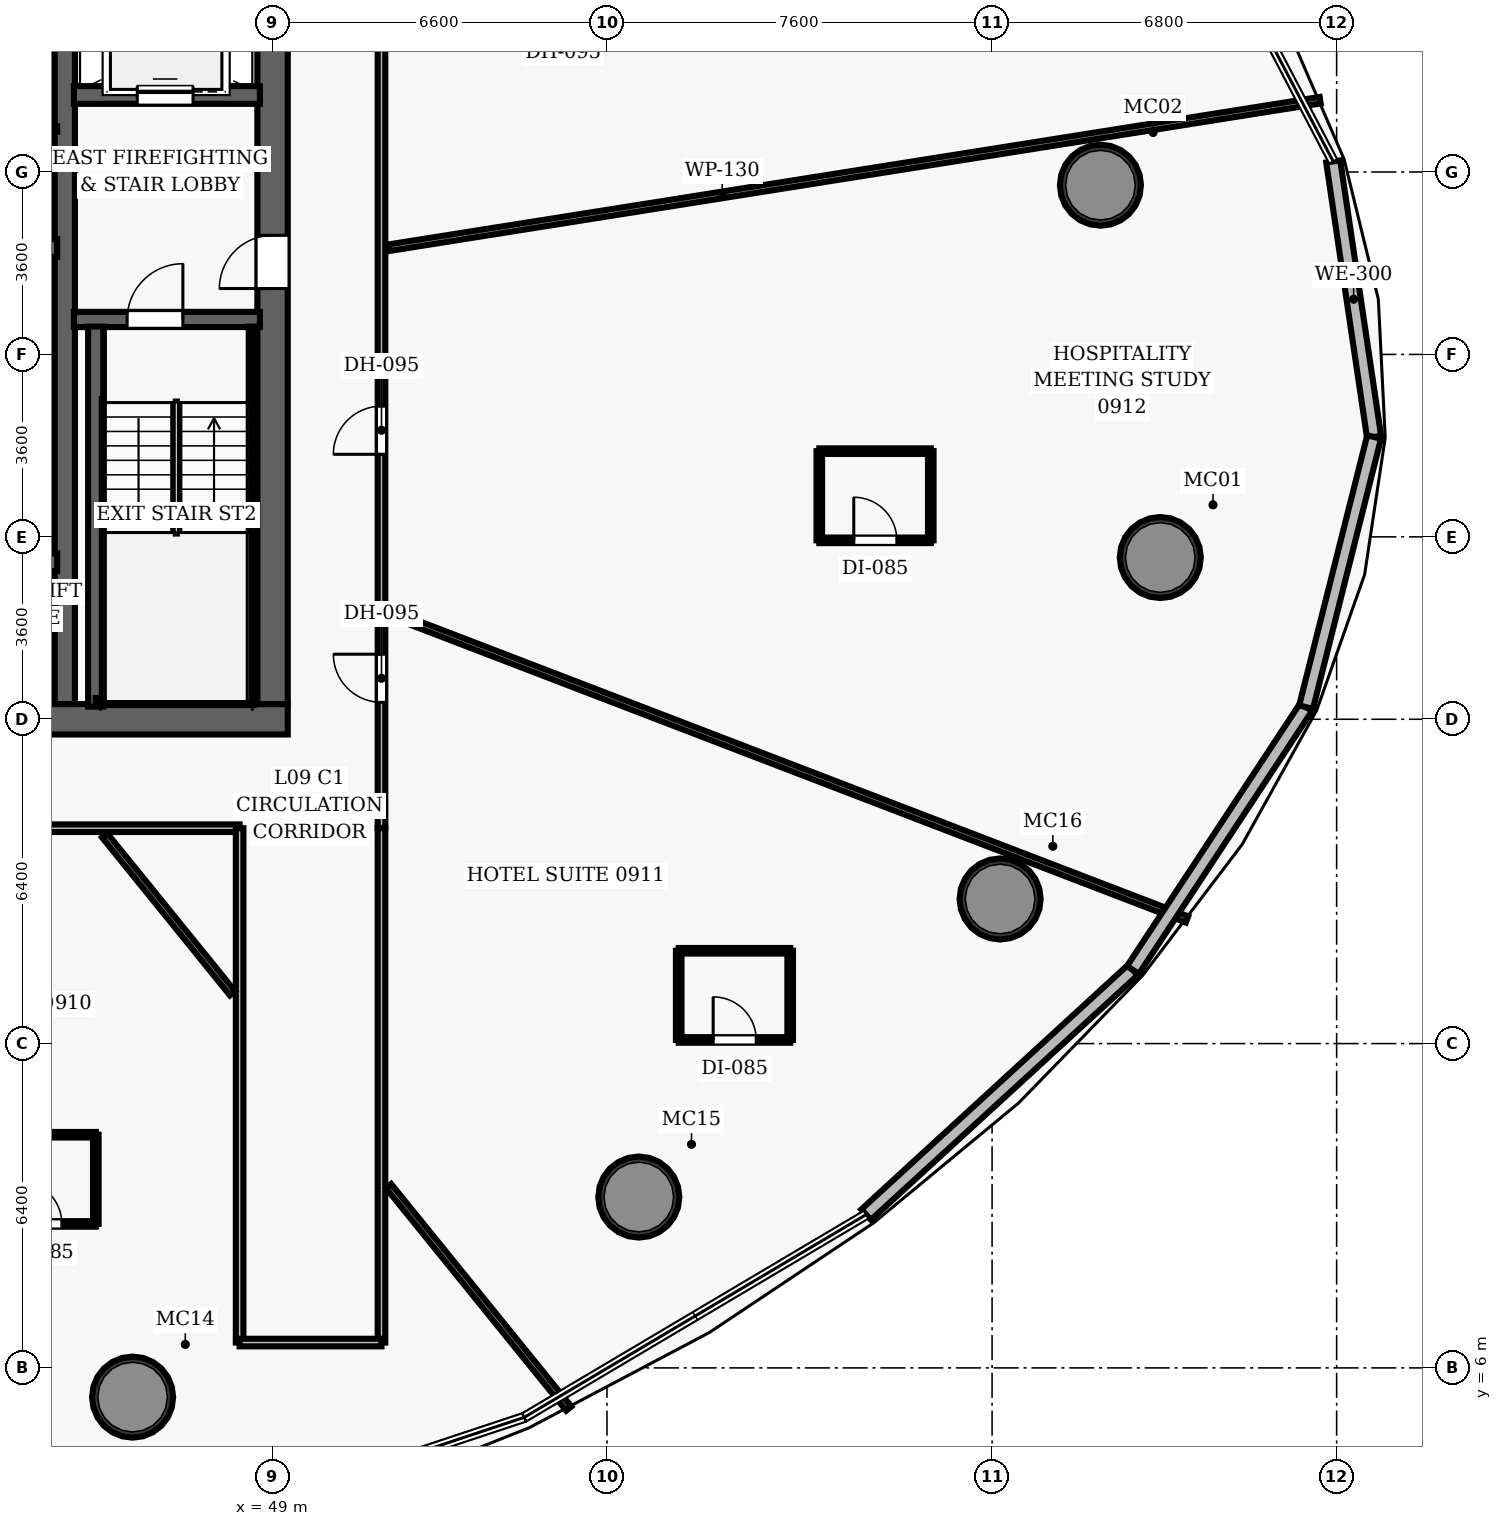
"""IFC4 building model, lengths in metres.
Left out: names, types, materials, properties, quantities, classifications, styles, units other than length and angle.
Written with IfcOpenShell. Run it as: python <this file> out.ifc"""

import sys

from ifc_helpers import new_model, si_unit, direction, frame, frame_2d, origin, origin_2d, place, context, subcontext, project, spatial, rectangle, hollow_circle, extrude, element, fill, save


model = new_model("IFC4")
c1 = context("Model", 3, precision=1e-05, world=origin(), true_north=direction((0.0, 1.0)))
c2 = subcontext(c1, "Body", "Model", "MODEL_VIEW")
j1 = project(units=[si_unit("LENGTHUNIT", "METRE"), si_unit("PLANEANGLEUNIT", "RADIAN")], contexts=[c1])
p1 = place(None, origin())
s1 = spatial("IfcSite", under=j1, at=p1, CompositionType="ELEMENT")
p2 = place(p1, origin())
s2 = spatial("IfcBuilding", under=s1, at=p2, CompositionType="ELEMENT")
p3 = place(p2, frame((0.0, 0.0, 48.4)))
s3 = spatial("IfcBuildingStorey", under=s2, at=p3, CompositionType="ELEMENT", Elevation=48.4)
p4 = place(p3, frame((26.7, 18.8, 0.0), z_axis=(0.0, 0.0, 1.0), x_axis=(1.0, 0.0, 0.0)))
e1 = element("IfcWall", 1, at=p4, inside=s3, PredefinedType="SHEAR", context=c2, shape_type="SweptSolid", body=[
    extrude(rectangle(XDim=22.6, YDim=0.6, at=frame_2d((11.3, 0.0))), origin(), (0.0, 0.0, 1.0), 3.5),
])
p5 = place(p4, frame((14.52, 0.0, 0.0)))
e2 = element("IfcOpeningElement", 2, at=p5, cuts=e1, PredefinedType="OPENING", context=c2, shape_type="SweptSolid", body=[
    extrude(rectangle(XDim=1.05, YDim=2.15, at=frame_2d((0.525, 1.075))), frame((0.0, 0.31, 0.0), z_axis=(0.0, -1.0, 0.0), x_axis=(1.0, 0.0, 0.0)), (0.0, 0.0, 1.0), 0.62),
])
p6 = place(p3, frame((49.0, 19.1, 0.0), z_axis=(0.0, 0.0, 1.0), x_axis=(0.0, 1.0, 0.0)))
e3 = element("IfcWall", 3, at=p6, inside=s3, PredefinedType="SHEAR", context=c2, shape_type="SweptSolid", body=[
    extrude(rectangle(XDim=13.8, YDim=0.6, at=frame_2d((6.9, 0.0))), origin(), (0.0, 0.0, 1.0), 3.5),
])
p7 = place(p6, frame((8.2, 0.0, 0.0)))
e4 = element("IfcOpeningElement", 4, at=p7, cuts=e3, PredefinedType="OPENING", context=c2, shape_type="SweptSolid", body=[
    extrude(rectangle(XDim=1.05, YDim=2.15, at=frame_2d((0.525, 1.075))), frame((0.0, 0.31, 0.0), z_axis=(0.0, -1.0, 0.0), x_axis=(1.0, 0.0, 0.0)), (0.0, 0.0, 1.0), 0.62),
])
p8 = place(p3, frame((44.9, 19.1, 0.0), z_axis=(0.0, 0.0, 1.0), x_axis=(0.0, 1.0, 0.0)))
e5 = element("IfcWall", 5, at=p8, inside=s3, PredefinedType="SHEAR", context=c2, shape_type="SweptSolid", body=[
    extrude(rectangle(XDim=13.8, YDim=0.4, at=frame_2d((6.9, 0.0))), origin(), (0.0, 0.0, 1.0), 3.5),
])
for number, where, z_axis, x_axis in (
    (6, (66.52, 21.992, 0.0), (0.0, 0.0, 1.0), (1.0, 0.0, 0.0)),
    (7, (65.339, 29.34, 0.0), (0.0, 0.0, 1.0), (1.0, 0.0, 0.0)),
    (8, (46.238, 5.423, 0.0), (0.0, 0.0, 1.0), (1.0, 0.0, 0.0)),
    (9, (56.228, 9.371, 0.0), (0.0, 0.0, 1.0), (1.0, 0.0, 0.0)),
    (10, (63.359, 15.254, 0.0), (0.0, 0.0, 1.0), (1.0, 0.0, 0.0)),
):
    element("IfcColumn", number, at=place(p3, frame(where, z_axis=z_axis, x_axis=x_axis)), inside=s3, PredefinedType="COLUMN", context=c2, shape_type="SweptSolid", body=[
        extrude(hollow_circle(Radius=0.8, WallThickness=0.06, at=origin_2d()), origin(), (0.0, 0.0, 1.0), 3.5),
    ])
p9 = place(p3, frame((45.08, 26.69, 0.0), z_axis=(0.0, 0.0, 1.0), x_axis=(1.0, 0.0, 0.0)))
e11 = element("IfcWall", 11, at=p9, inside=s3, PredefinedType="SHEAR", context=c2, shape_type="SweptSolid", body=[
    extrude(rectangle(XDim=3.67, YDim=0.3, at=frame_2d((1.835, 0.0))), origin(), (0.0, 0.0, 1.0), 3.5),
])
p10 = place(p9, frame((1.05, 0.0, 0.0)))
e12 = element("IfcOpeningElement", 12, at=p10, cuts=e11, PredefinedType="OPENING", context=c2, shape_type="SweptSolid", body=[
    extrude(rectangle(XDim=1.1, YDim=2.15, at=frame_2d((0.55, 1.075))), frame((0.0, 0.16, 0.0), z_axis=(0.0, -1.0, 0.0), x_axis=(1.0, 0.0, 0.0)), (0.0, 0.0, 1.0), 0.32),
])
p11 = place(p3, frame((45.51, 19.05, 0.0), z_axis=(0.0, 0.0, 1.0), x_axis=(0.0, 1.0, 0.0)))
e13 = element("IfcWall", 13, at=p11, inside=s3, PredefinedType="SHEAR", context=c2, shape_type="SweptSolid", body=[
    extrude(rectangle(XDim=7.5, YDim=0.3, at=frame_2d((3.75, 0.0))), origin(), (0.0, 0.0, 1.0), 3.5),
])
p12 = place(p3, frame((48.605, 19.1, 0.0), z_axis=(0.0, 0.0, 1.0), x_axis=(0.0, 1.0, 0.0)))
e14 = element("IfcWall", 14, at=p12, inside=s3, PredefinedType="SHEAR", context=c2, shape_type="SweptSolid", body=[
    extrude(rectangle(XDim=7.45, YDim=0.12, at=frame_2d((3.725, 0.0))), origin(), (0.0, 0.0, 1.0), 3.5),
])
p13 = place(p3, frame((45.51, 19.16, 0.0), z_axis=(0.0, 0.0, 1.0), x_axis=(1.0, 0.0, 0.0)))
e15 = element("IfcWall", 15, at=p13, inside=s3, PredefinedType="SHEAR", context=c2, shape_type="SweptSolid", body=[
    extrude(rectangle(XDim=3.095, YDim=0.12, at=frame_2d((1.547, 0.0))), origin(), (0.0, 0.0, 1.0), 3.5),
])
p14 = place(p3, frame((45.08, 31.12, 0.0), z_axis=(0.0, 0.0, 1.0), x_axis=(1.0, 0.0, 0.0)))
e16 = element("IfcWall", 16, at=p14, inside=s3, PredefinedType="SHEAR", context=c2, shape_type="SweptSolid", body=[
    extrude(rectangle(XDim=3.67, YDim=0.35, at=frame_2d((1.835, 0.0))), origin(), (0.0, 0.0, 1.0), 2.6),
])
p15 = place(p14, frame((1.25, 0.0, 0.0)))
e17 = element("IfcOpeningElement", 17, at=p15, cuts=e16, PredefinedType="OPENING", context=c2, shape_type="SweptSolid", body=[
    extrude(rectangle(XDim=1.1, YDim=2.15, at=frame_2d((0.55, 1.075))), frame((0.0, 0.185, 0.0), z_axis=(0.0, -1.0, 0.0), x_axis=(1.0, 0.0, 0.0)), (0.0, 0.0, 1.0), 0.37),
])
for number, where, z_axis, x_axis in (
    (18, (42.72, 21.9, 0.0), (0.0, 0.0, 1.0), (1.0, 0.0, 0.0)),
    (19, (42.72, 28.1, 0.0), (0.0, 0.0, 1.0), (1.0, 0.0, 0.0)),
):
    element("IfcWall", number, at=place(p3, frame(where, z_axis=z_axis, x_axis=x_axis)), inside=s3, PredefinedType="SHEAR", context=c2, shape_type="SweptSolid", body=[
        extrude(rectangle(XDim=2.03, YDim=0.35, at=frame_2d((1.015, 0.0))), origin(), (0.0, 0.0, 1.0), 2.6),
    ])
p16 = place(p3, frame((42.55, 30.45, 0.0), z_axis=(0.0, 0.0, 1.0), x_axis=(1.0, 0.0, 0.0)))
e20 = element("IfcWall", 20, at=p16, inside=s3, PredefinedType="PARTITIONING", context=c2, shape_type="SweptSolid", body=[
    extrude(rectangle(XDim=2.2, YDim=0.11, at=frame_2d((1.1, 0.0))), origin(), (0.0, 0.0, 1.0), 2.6),
])
p17 = place(p3, frame((24.85, 16.65, 0.0), z_axis=(0.0, 0.0, 1.0), x_axis=(1.0, 0.0, 0.0)))
e21 = element("IfcWall", 21, at=p17, inside=s3, PredefinedType="PARTITIONING", context=c2, shape_type="SweptSolid", body=[
    extrude(rectangle(XDim=23.5, YDim=0.15, at=frame_2d((11.75, 0.0))), origin(), (0.0, 0.0, 1.0), 2.6),
])
p18 = place(p17, frame((7.157, 0.0, 0.0)))
e22 = element("IfcOpeningElement", 22, at=p18, cuts=e21, PredefinedType="OPENING", context=c2, shape_type="SweptSolid", body=[
    extrude(rectangle(XDim=0.95, YDim=2.15, at=frame_2d((0.475, 1.075))), frame((0.0, 0.085, 0.0), z_axis=(0.0, -1.0, 0.0), x_axis=(1.0, 0.0, 0.0)), (0.0, 0.0, 1.0), 0.17),
])
p19 = place(p17, frame((13.039, 0.0, 0.0)))
e23 = element("IfcOpeningElement", 23, at=p19, cuts=e21, PredefinedType="OPENING", context=c2, shape_type="SweptSolid", body=[
    extrude(rectangle(XDim=0.95, YDim=2.15, at=frame_2d((0.475, 1.075))), frame((0.0, 0.085, 0.0), z_axis=(0.0, -1.0, 0.0), x_axis=(1.0, 0.0, 0.0)), (0.0, 0.0, 1.0), 0.17),
])
p20 = place(p17, frame((15.573, 0.0, 0.0)))
e24 = element("IfcOpeningElement", 24, at=p20, cuts=e21, PredefinedType="OPENING", context=c2, shape_type="SweptSolid", body=[
    extrude(rectangle(XDim=0.95, YDim=2.15, at=frame_2d((0.475, 1.075))), frame((0.0, 0.085, 0.0), z_axis=(0.0, -1.0, 0.0), x_axis=(1.0, 0.0, 0.0)), (0.0, 0.0, 1.0), 0.17),
])
p21 = place(p3, frame((51.15, 16.65, 0.0), z_axis=(0.0, 0.0, 1.0), x_axis=(0.0, 1.0, 0.0)))
e25 = element("IfcWall", 25, at=p21, inside=s3, PredefinedType="PARTITIONING", context=c2, shape_type="SweptSolid", body=[
    extrude(rectangle(XDim=15.9, YDim=0.15, at=frame_2d((7.95, 0.0))), origin(), (0.0, 0.0, 1.0), 2.6),
])
p22 = place(p21, frame((2.484, 0.0, 0.0)))
e26 = element("IfcOpeningElement", 26, at=p22, cuts=e25, PredefinedType="OPENING", context=c2, shape_type="SweptSolid", body=[
    extrude(rectangle(XDim=0.95, YDim=2.15, at=frame_2d((0.475, 1.075))), frame((0.0, 0.085, 0.0), z_axis=(0.0, -1.0, 0.0), x_axis=(1.0, 0.0, 0.0)), (0.0, 0.0, 1.0), 0.17),
])
p23 = place(p21, frame((7.379, 0.0, 0.0)))
e27 = element("IfcOpeningElement", 27, at=p23, cuts=e25, PredefinedType="OPENING", context=c2, shape_type="SweptSolid", body=[
    extrude(rectangle(XDim=0.95, YDim=2.15, at=frame_2d((0.475, 1.075))), frame((0.0, 0.085, 0.0), z_axis=(0.0, -1.0, 0.0), x_axis=(1.0, 0.0, 0.0)), (0.0, 0.0, 1.0), 0.17),
])
for number, where, z_axis, x_axis in (
    (28, (48.35, 6.5, 0.0), (0.0, 0.0, 1.0), (0.0, 1.0, 0.0)),
    (29, (51.15, 6.5, 0.0), (0.0, 0.0, 1.0), (0.0, 1.0, 0.0)),
):
    element("IfcWall", number, at=place(p3, frame(where, z_axis=z_axis, x_axis=x_axis)), inside=s3, PredefinedType="PARTITIONING", context=c2, shape_type="SweptSolid", body=[
        extrude(rectangle(XDim=10.15, YDim=0.15, at=frame_2d((5.075, 0.0))), origin(), (0.0, 0.0, 1.0), 2.6),
    ])
p24 = place(p3, frame((48.35, 6.5, 0.0), z_axis=(0.0, 0.0, 1.0), x_axis=(1.0, 0.0, 0.0)))
e30 = element("IfcWall", 30, at=p24, inside=s3, PredefinedType="PARTITIONING", context=c2, shape_type="SweptSolid", body=[
    extrude(rectangle(XDim=2.8, YDim=0.15, at=frame_2d((1.4, 0.0))), origin(), (0.0, 0.0, 1.0), 2.6),
])
p25 = place(p3, frame((51.29, 28.105, 0.0), z_axis=(0.0, 0.0, 1.0), x_axis=(0.987689587694, 0.156426590965, 0.0)))
e31 = element("IfcWall", 31, at=p25, inside=s3, PredefinedType="PARTITIONING", context=c2, shape_type="SweptSolid", body=[
    extrude(rectangle(XDim=18.615, YDim=0.13, at=frame_2d((9.308, 0.0))), origin(), (0.0, 0.0, 1.0), 2.6),
])
p26 = place(p3, frame((45.685, 16.51, 0.0), z_axis=(0.0, 0.0, 1.0), x_axis=(0.629306741086, -0.777157014782, 0.0)))
e32 = element("IfcWall", 32, at=p26, inside=s3, PredefinedType="PARTITIONING", context=c2, shape_type="SweptSolid", body=[
    extrude(rectangle(XDim=4.013, YDim=0.13, at=frame_2d((2.006, 0.0))), origin(), (0.0, 0.0, 1.0), 2.6),
])
p27 = place(p3, frame((51.29, 9.588, 0.0), z_axis=(0.0, 0.0, 1.0), x_axis=(0.629326246379, -0.777141219868, 0.0)))
e33 = element("IfcWall", 33, at=p27, inside=s3, PredefinedType="PARTITIONING", context=c2, shape_type="SweptSolid", body=[
    extrude(rectangle(XDim=5.65, YDim=0.13, at=frame_2d((2.825, 0.0))), origin(), (0.0, 0.0, 1.0), 2.6),
])
p28 = place(p3, frame((51.29, 20.898, 0.0), z_axis=(0.0, 0.0, 1.0), x_axis=(0.933579150915, -0.358371272533, 0.0)))
e34 = element("IfcWall", 34, at=p28, inside=s3, PredefinedType="PARTITIONING", context=c2, shape_type="SweptSolid", body=[
    extrude(rectangle(XDim=16.879, YDim=0.13, at=frame_2d((8.439, 0.0))), origin(), (0.0, 0.0, 1.0), 2.6),
])
p29 = place(p3, frame((43.312, 8.841, 0.0), z_axis=(0.0, 0.0, 1.0), x_axis=(1.0, 0.0, 0.0)))
e35 = element("IfcWall", 35, at=p29, inside=s3, PredefinedType="PARTITIONING", context=c2, shape_type="SweptSolid", body=[
    extrude(rectangle(XDim=2.2, YDim=0.11, at=frame_2d((1.1, 0.0))), origin(), (0.0, 0.0, 1.0), 2.6),
])
p30 = place(p29, frame((0.68, 0.0, 0.0)))
e36 = element("IfcOpeningElement", 36, at=p30, cuts=e35, PredefinedType="OPENING", context=c2, shape_type="SweptSolid", body=[
    extrude(rectangle(XDim=0.85, YDim=2.1, at=frame_2d((0.425, 1.05))), frame((0.0, 0.065, 0.0), z_axis=(0.0, -1.0, 0.0), x_axis=(1.0, 0.0, 0.0)), (0.0, 0.0, 1.0), 0.13),
])
p31 = place(p3, frame((43.312, 10.601, 0.0), z_axis=(0.0, 0.0, 1.0), x_axis=(1.0, 0.0, 0.0)))
e37 = element("IfcWall", 37, at=p31, inside=s3, PredefinedType="PARTITIONING", context=c2, shape_type="SweptSolid", body=[
    extrude(rectangle(XDim=2.2, YDim=0.11, at=frame_2d((1.1, 0.0))), origin(), (0.0, 0.0, 1.0), 2.6),
])
p32 = place(p3, frame((45.512, 8.841, 0.0), z_axis=(0.0, 0.0, 1.0), x_axis=(0.0, 1.0, 0.0)))
e38 = element("IfcWall", 38, at=p32, inside=s3, PredefinedType="PARTITIONING", context=c2, shape_type="SweptSolid", body=[
    extrude(rectangle(XDim=1.76, YDim=0.11, at=frame_2d((0.88, 0.0))), origin(), (0.0, 0.0, 1.0), 2.6),
])
p33 = place(p3, frame((57.015, 12.472, 0.0), z_axis=(0.0, 0.0, 1.0), x_axis=(1.0, 0.0, 0.0)))
e39 = element("IfcWall", 39, at=p33, inside=s3, PredefinedType="PARTITIONING", context=c2, shape_type="SweptSolid", body=[
    extrude(rectangle(XDim=2.2, YDim=0.11, at=frame_2d((1.1, 0.0))), origin(), (0.0, 0.0, 1.0), 2.6),
])
p34 = place(p33, frame((0.68, 0.0, 0.0)))
e40 = element("IfcOpeningElement", 40, at=p34, cuts=e39, PredefinedType="OPENING", context=c2, shape_type="SweptSolid", body=[
    extrude(rectangle(XDim=0.85, YDim=2.1, at=frame_2d((0.425, 1.05))), frame((0.0, 0.065, 0.0), z_axis=(0.0, -1.0, 0.0), x_axis=(1.0, 0.0, 0.0)), (0.0, 0.0, 1.0), 0.13),
])
p35 = place(p3, frame((57.015, 14.232, 0.0), z_axis=(0.0, 0.0, 1.0), x_axis=(1.0, 0.0, 0.0)))
e41 = element("IfcWall", 41, at=p35, inside=s3, PredefinedType="PARTITIONING", context=c2, shape_type="SweptSolid", body=[
    extrude(rectangle(XDim=2.2, YDim=0.11, at=frame_2d((1.1, 0.0))), origin(), (0.0, 0.0, 1.0), 2.6),
])
for number, where, z_axis, x_axis in (
    (42, (57.015, 12.472, 0.0), (0.0, 0.0, 1.0), (0.0, 1.0, 0.0)),
    (43, (59.216, 12.472, 0.0), (0.0, 0.0, 1.0), (0.0, 1.0, 0.0)),
):
    element("IfcWall", number, at=place(p3, frame(where, z_axis=z_axis, x_axis=x_axis)), inside=s3, PredefinedType="PARTITIONING", context=c2, shape_type="SweptSolid", body=[
        extrude(rectangle(XDim=1.76, YDim=0.11, at=frame_2d((0.88, 0.0))), origin(), (0.0, 0.0, 1.0), 2.6),
    ])
p36 = place(p3, frame((59.79, 22.331, 0.0), z_axis=(0.0, 0.0, 1.0), x_axis=(1.0, 0.0, 0.0)))
e44 = element("IfcWall", 44, at=p36, inside=s3, PredefinedType="PARTITIONING", context=c2, shape_type="SweptSolid", body=[
    extrude(rectangle(XDim=2.2, YDim=0.11, at=frame_2d((1.1, 0.0))), origin(), (0.0, 0.0, 1.0), 2.6),
])
p37 = place(p36, frame((0.68, 0.0, 0.0)))
e45 = element("IfcOpeningElement", 45, at=p37, cuts=e44, PredefinedType="OPENING", context=c2, shape_type="SweptSolid", body=[
    extrude(rectangle(XDim=0.85, YDim=2.1, at=frame_2d((0.425, 1.05))), frame((0.0, 0.065, 0.0), z_axis=(0.0, -1.0, 0.0), x_axis=(1.0, 0.0, 0.0)), (0.0, 0.0, 1.0), 0.13),
])
p38 = place(p3, frame((59.79, 24.091, 0.0), z_axis=(0.0, 0.0, 1.0), x_axis=(1.0, 0.0, 0.0)))
e46 = element("IfcWall", 46, at=p38, inside=s3, PredefinedType="PARTITIONING", context=c2, shape_type="SweptSolid", body=[
    extrude(rectangle(XDim=2.2, YDim=0.11, at=frame_2d((1.1, 0.0))), origin(), (0.0, 0.0, 1.0), 2.6),
])
for number, where, z_axis, x_axis in (
    (47, (59.79, 22.331, 0.0), (0.0, 0.0, 1.0), (0.0, 1.0, 0.0)),
    (48, (61.99, 22.331, 0.0), (0.0, 0.0, 1.0), (0.0, 1.0, 0.0)),
):
    element("IfcWall", number, at=place(p3, frame(where, z_axis=z_axis, x_axis=x_axis)), inside=s3, PredefinedType="PARTITIONING", context=c2, shape_type="SweptSolid", body=[
        extrude(rectangle(XDim=1.76, YDim=0.11, at=frame_2d((0.88, 0.0))), origin(), (0.0, 0.0, 1.0), 2.6),
    ])
p39 = place(p3, frame((69.933, 29.808, 0.0), z_axis=(0.0, 0.0, 1.0), x_axis=(0.146728919415, -0.989176740632, 0.0)))
e49 = element("IfcWall", 49, at=p39, inside=s3, PredefinedType="SOLIDWALL", context=c2, shape_type="SweptSolid", body=[
    extrude(rectangle(XDim=5.498, YDim=0.28, at=frame_2d((2.749, 0.0))), origin(), (0.0, 0.0, 1.0), 3.25),
])
p40 = place(p3, frame((65.979, 13.851, 0.0), z_axis=(0.0, 0.0, 1.0), x_axis=(-0.737118668076, -0.675763323342, 0.0)))
e50 = element("IfcWall", 50, at=p40, inside=s3, PredefinedType="SOLIDWALL", context=c2, shape_type="SweptSolid", body=[
    extrude(rectangle(XDim=7.143, YDim=0.28, at=frame_2d((3.571, 0.0))), origin(), (0.0, 0.0, 1.0), 3.25),
])
p41 = place(p3, frame((69.397, 19.039, 0.0), z_axis=(0.0, 0.0, 1.0), x_axis=(-0.550075476481, -0.835114944289, 0.0)))
e51 = element("IfcWall", 51, at=p41, inside=s3, PredefinedType="SOLIDWALL", context=c2, shape_type="SweptSolid", body=[
    extrude(rectangle(XDim=6.212, YDim=0.28, at=frame_2d((3.106, 0.0))), origin(), (0.0, 0.0, 1.0), 3.25),
])
p42 = place(p3, frame((70.74, 24.37, 0.0), z_axis=(0.0, 0.0, 1.0), x_axis=(-0.244259426183, -0.969709921946, 0.0)))
e52 = element("IfcWall", 52, at=p42, inside=s3, PredefinedType="SOLIDWALL", context=c2, shape_type="SweptSolid", body=[
    extrude(rectangle(XDim=5.497, YDim=0.28, at=frame_2d((2.749, 0.0))), origin(), (0.0, 0.0, 1.0), 3.25),
])
p43 = place(p10, origin())
e53 = element("IfcDoor", 53, at=p43, inside=s3, OperationType="SINGLE_SWING_RIGHT", PredefinedType="DOOR", context=c2, shape_type="SweptSolid", body=[
    extrude(rectangle(XDim=1.1, YDim=2.15, at=frame_2d((0.55, 1.075))), frame((0.0, 0.025, 0.0), z_axis=(0.0, -1.0, 0.0), x_axis=(1.0, 0.0, 0.0)), (0.0, 0.0, 1.0), 0.05),
])
fill(e12, e53)
p44 = place(p7, origin())
e54 = element("IfcDoor", 54, at=p44, inside=s3, OperationType="SINGLE_SWING_LEFT", PredefinedType="DOOR", context=c2, shape_type="SweptSolid", body=[
    extrude(rectangle(XDim=1.05, YDim=2.15, at=frame_2d((0.525, 1.075))), frame((0.0, 0.025, 0.0), z_axis=(0.0, -1.0, 0.0), x_axis=(1.0, 0.0, 0.0)), (0.0, 0.0, 1.0), 0.05),
])
fill(e4, e54)
p45 = place(p30, origin())
e55 = element("IfcDoor", 55, at=p45, inside=s3, OperationType="SINGLE_SWING_LEFT", PredefinedType="DOOR", context=c2, shape_type="SweptSolid", body=[
    extrude(rectangle(XDim=0.85, YDim=2.1, at=frame_2d((0.425, 1.05))), frame((0.0, 0.025, 0.0), z_axis=(0.0, -1.0, 0.0), x_axis=(1.0, 0.0, 0.0)), (0.0, 0.0, 1.0), 0.05),
])
fill(e36, e55)
p46 = place(p22, origin())
e56 = element("IfcDoor", 56, at=p46, inside=s3, OperationType="SINGLE_SWING_RIGHT", PredefinedType="DOOR", context=c2, shape_type="SweptSolid", body=[
    extrude(rectangle(XDim=0.95, YDim=2.15, at=frame_2d((0.475, 1.075))), frame((0.0, 0.025, 0.0), z_axis=(0.0, -1.0, 0.0), x_axis=(1.0, 0.0, 0.0)), (0.0, 0.0, 1.0), 0.05),
])
fill(e26, e56)
p47 = place(p34, origin())
e57 = element("IfcDoor", 57, at=p47, inside=s3, OperationType="SINGLE_SWING_LEFT", PredefinedType="DOOR", context=c2, shape_type="SweptSolid", body=[
    extrude(rectangle(XDim=0.85, YDim=2.1, at=frame_2d((0.425, 1.05))), frame((0.0, 0.025, 0.0), z_axis=(0.0, -1.0, 0.0), x_axis=(1.0, 0.0, 0.0)), (0.0, 0.0, 1.0), 0.05),
])
fill(e40, e57)
p48 = place(p23, origin())
e58 = element("IfcDoor", 58, at=p48, inside=s3, OperationType="SINGLE_SWING_LEFT", PredefinedType="DOOR", context=c2, shape_type="SweptSolid", body=[
    extrude(rectangle(XDim=0.95, YDim=2.15, at=frame_2d((0.475, 1.075))), frame((0.0, 0.025, 0.0), z_axis=(0.0, -1.0, 0.0), x_axis=(1.0, 0.0, 0.0)), (0.0, 0.0, 1.0), 0.05),
])
fill(e27, e58)
p49 = place(p37, origin())
e59 = element("IfcDoor", 59, at=p49, inside=s3, OperationType="SINGLE_SWING_LEFT", PredefinedType="DOOR", context=c2, shape_type="SweptSolid", body=[
    extrude(rectangle(XDim=0.85, YDim=2.1, at=frame_2d((0.425, 1.05))), frame((0.0, 0.025, 0.0), z_axis=(0.0, -1.0, 0.0), x_axis=(1.0, 0.0, 0.0)), (0.0, 0.0, 1.0), 0.05),
])
fill(e45, e59)
p50 = place(p15, origin())
e60 = element("IfcDoor", 60, at=p50, inside=s3, OperationType="SLIDING_TO_LEFT", PredefinedType="DOOR", context=c2, shape_type="SweptSolid", body=[
    extrude(rectangle(XDim=1.1, YDim=2.15, at=frame_2d((0.55, 1.075))), frame((0.0, 0.025, 0.0), z_axis=(0.0, -1.0, 0.0), x_axis=(1.0, 0.0, 0.0)), (0.0, 0.0, 1.0), 0.05),
])
fill(e17, e60)
save(model, sys.argv[1])
